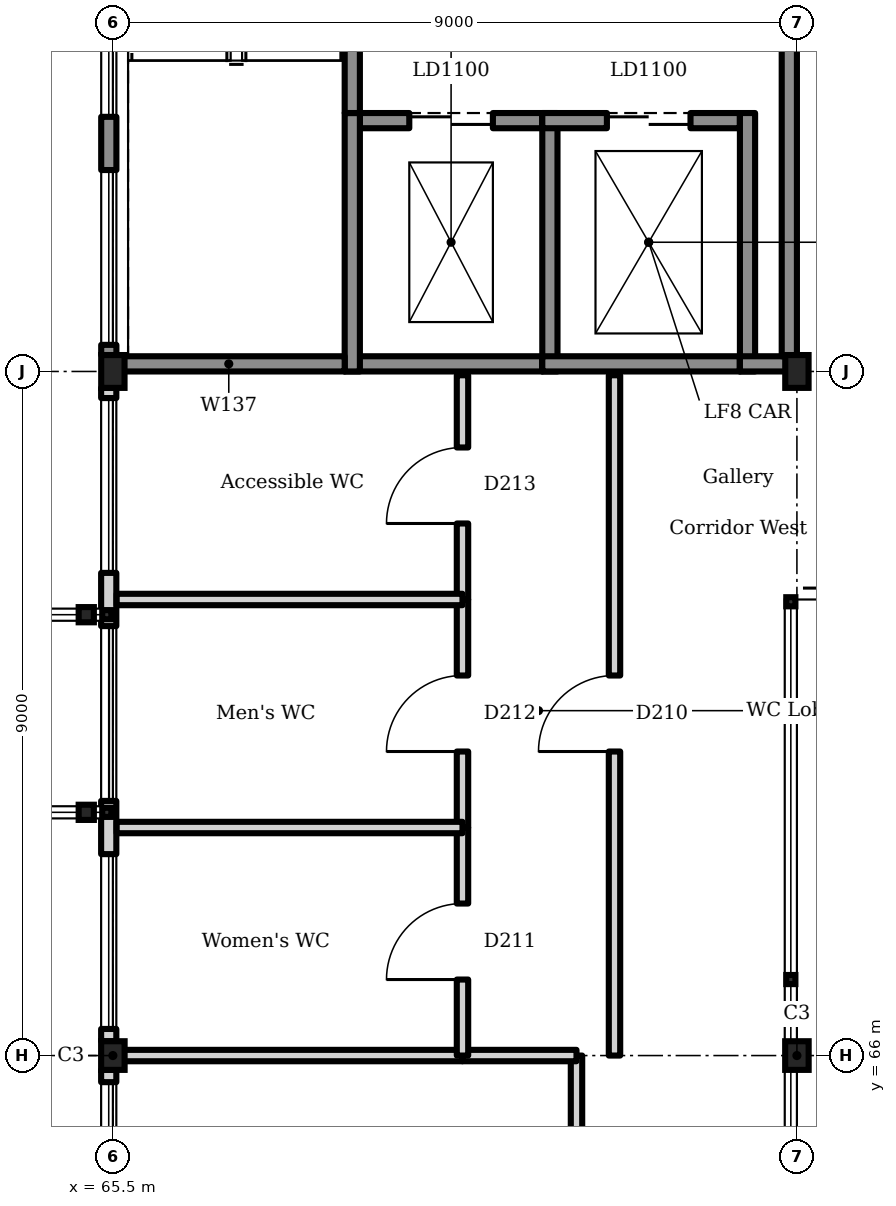
"""IFC4 building model, lengths in metres.
Left out: names, types, materials, properties, quantities, classifications, styles, units other than length and angle.
Written with IfcOpenShell. Run it as: python <this file> out.ifc"""

import sys

from ifc_helpers import new_model, si_unit, direction, frame, frame_2d, origin, origin_2d, place, context, subcontext, project, spatial, rectangle, hollow_rectangle, i_section, extrude, element, fill, save


model = new_model("IFC4")
c1 = context("Model", 3, precision=1e-05, world=origin(), true_north=direction((0.0, 1.0)))
c2 = subcontext(c1, "Body", "Model", "MODEL_VIEW")
j1 = project(units=[si_unit("LENGTHUNIT", "METRE"), si_unit("PLANEANGLEUNIT", "RADIAN")], contexts=[c1])
p1 = place(None, origin())
s1 = spatial("IfcSite", under=j1, at=p1, CompositionType="ELEMENT")
p2 = place(p1, origin())
s2 = spatial("IfcBuilding", under=s1, at=p2, CompositionType="ELEMENT")
p3 = place(p2, frame((0.0, 0.0, 14.4)))
s3 = spatial("IfcBuildingStorey", under=s2, at=p3, CompositionType="ELEMENT", Elevation=14.4)
p4 = place(p3, frame((68.75, 78.3, 0.0), z_axis=(0.0, 0.0, 1.0), x_axis=(1.0, 0.0, 0.0)))
e1 = element("IfcWall", 1, at=p4, inside=s3, PredefinedType="SOLIDWALL", context=c2, shape_type="SweptSolid", body=[
    extrude(rectangle(XDim=2.4, YDim=0.2, at=frame_2d((1.2, 0.0))), origin(), (0.0, 0.0, 1.0), 4.5),
])
p5 = place(p4, frame((0.65, 0.0, 0.0)))
e2 = element("IfcOpeningElement", 2, at=p5, cuts=e1, PredefinedType="OPENING", context=c2, shape_type="SweptSolid", body=[
    extrude(rectangle(XDim=1.1, YDim=2.1, at=frame_2d((0.55, 1.05))), frame((0.0, 0.11, 0.0), z_axis=(0.0, -1.0, 0.0), x_axis=(1.0, 0.0, 0.0)), (0.0, 0.0, 1.0), 0.22),
])
p6 = place(p3, frame((68.55, 75.1, 0.0), z_axis=(0.0, 0.0, 1.0), x_axis=(1.0, 0.0, 0.0)))
e3 = element("IfcWall", 3, at=p6, inside=s3, PredefinedType="SOLIDWALL", context=c2, shape_type="SweptSolid", body=[
    extrude(rectangle(XDim=2.6, YDim=0.2, at=frame_2d((1.3, 0.0))), origin(), (0.0, 0.0, 1.0), 4.5),
])
for number, where, z_axis, x_axis in (
    (4, (68.65, 75.0, 0.0), (0.0, 0.0, 1.0), (0.0, 1.0, 0.0)),
    (5, (71.25, 75.0, 0.0), (0.0, 0.0, 1.0), (0.0, 1.0, 0.0)),
):
    element("IfcWall", number, at=place(p3, frame(where, z_axis=z_axis, x_axis=x_axis)), inside=s3, PredefinedType="SOLIDWALL", context=c2, shape_type="SweptSolid", body=[
        extrude(rectangle(XDim=3.4, YDim=0.2, at=frame_2d((1.7, 0.0))), origin(), (0.0, 0.0, 1.0), 4.5),
    ])
p7 = place(p3, frame((71.15, 78.3, 0.0), z_axis=(0.0, 0.0, 1.0), x_axis=(1.0, 0.0, 0.0)))
e6 = element("IfcWall", 6, at=p7, inside=s3, PredefinedType="SOLIDWALL", context=c2, shape_type="SweptSolid", body=[
    extrude(rectangle(XDim=2.6, YDim=0.2, at=frame_2d((1.3, 0.0))), origin(), (0.0, 0.0, 1.0), 4.5),
])
p8 = place(p7, frame((0.85, 0.0, 0.0)))
e7 = element("IfcOpeningElement", 7, at=p8, cuts=e6, PredefinedType="OPENING", context=c2, shape_type="SweptSolid", body=[
    extrude(rectangle(XDim=1.1, YDim=2.1, at=frame_2d((0.55, 1.05))), frame((0.0, 0.11, 0.0), z_axis=(0.0, -1.0, 0.0), x_axis=(1.0, 0.0, 0.0)), (0.0, 0.0, 1.0), 0.22),
])
p9 = place(p3, frame((71.15, 75.1, 0.0), z_axis=(0.0, 0.0, 1.0), x_axis=(1.0, 0.0, 0.0)))
e8 = element("IfcWall", 8, at=p9, inside=s3, PredefinedType="SOLIDWALL", context=c2, shape_type="SweptSolid", body=[
    extrude(rectangle(XDim=2.6, YDim=0.2, at=frame_2d((1.3, 0.0))), origin(), (0.0, 0.0, 1.0), 4.5),
])
p10 = place(p3, frame((73.85, 75.0, 0.0), z_axis=(0.0, 0.0, 1.0), x_axis=(0.0, 1.0, 0.0)))
e9 = element("IfcWall", 9, at=p10, inside=s3, PredefinedType="SOLIDWALL", context=c2, shape_type="SweptSolid", body=[
    extrude(rectangle(XDim=3.4, YDim=0.2, at=frame_2d((1.7, 0.0))), origin(), (0.0, 0.0, 1.0), 4.5),
])
for number, where, z_axis, x_axis in (
    (10, (65.5, 66.0, 0.0), (0.0, 0.0, 1.0), (1.0, 0.0, 0.0)),
    (11, (74.5, 66.0, 0.0), (0.0, 0.0, 1.0), (1.0, 0.0, 0.0)),
):
    element("IfcColumn", number, at=place(p3, frame(where, z_axis=z_axis, x_axis=x_axis)), inside=s3, PredefinedType="COLUMN", context=c2, shape_type="SweptSolid", body=[
        extrude(i_section(OverallWidth=0.309, OverallDepth=0.377, WebThickness=0.021, FlangeThickness=0.04, FilletRadius=0.027, at=origin_2d()), origin(), (0.0, 0.0, 1.0), 4.25),
    ])
for number, where, z_axis, x_axis in (
    (12, (65.5, 75.0, 0.0), (0.0, 0.0, 1.0), (1.0, 0.0, 0.0)),
    (13, (74.5, 75.0, 0.0), (0.0, 0.0, 1.0), (1.0, 0.0, 0.0)),
):
    element("IfcColumn", number, at=place(p3, frame(where, z_axis=z_axis, x_axis=x_axis)), inside=s3, PredefinedType="COLUMN", context=c2, shape_type="SweptSolid", body=[
        extrude(i_section(OverallWidth=0.307, OverallDepth=0.432, WebThickness=0.021, FlangeThickness=0.04, FilletRadius=0.027, at=origin_2d()), origin(), (0.0, 0.0, 1.0), 4.5),
    ])
p11 = place(p3, frame((65.446, 57.188, 0.0), z_axis=(0.0, 0.0, 1.0), x_axis=(0.0, 1.0, 0.0)))
e14 = element("IfcWall", 14, at=p11, inside=s3, PredefinedType="SOLIDWALL", context=c2, shape_type="SweptSolid", body=[
    extrude(rectangle(XDim=8.623, YDim=0.2, at=frame_2d((4.312, 0.0))), origin(), (0.0, 0.0, 1.0), 3.8),
])
p12 = place(p11, frame((0.162, 0.0, 0.9)))
e15 = element("IfcOpeningElement", 15, at=p12, cuts=e14, PredefinedType="OPENING", context=c2, shape_type="SweptSolid", body=[
    extrude(rectangle(XDim=2.3, YDim=2.7, at=frame_2d((1.15, 1.35))), frame((0.0, 0.11, 0.0), z_axis=(0.0, -1.0, 0.0), x_axis=(1.0, 0.0, 0.0)), (0.0, 0.0, 1.0), 0.22),
])
p13 = place(p11, frame((3.162, 0.0, 0.9)))
e16 = element("IfcOpeningElement", 16, at=p13, cuts=e14, PredefinedType="OPENING", context=c2, shape_type="SweptSolid", body=[
    extrude(rectangle(XDim=2.3, YDim=2.7, at=frame_2d((1.15, 1.35))), frame((0.0, 0.11, 0.0), z_axis=(0.0, -1.0, 0.0), x_axis=(1.0, 0.0, 0.0)), (0.0, 0.0, 1.0), 0.22),
])
p14 = place(p11, frame((6.162, 0.0, 0.9)))
e17 = element("IfcOpeningElement", 17, at=p14, cuts=e14, PredefinedType="OPENING", context=c2, shape_type="SweptSolid", body=[
    extrude(rectangle(XDim=2.3, YDim=2.7, at=frame_2d((1.15, 1.35))), frame((0.0, 0.11, 0.0), z_axis=(0.0, -1.0, 0.0), x_axis=(1.0, 0.0, 0.0)), (0.0, 0.0, 1.0), 0.22),
])
p15 = place(p3, frame((65.446, 66.188, 0.0), z_axis=(0.0, 0.0, 1.0), x_axis=(0.0, 1.0, 0.0)))
e18 = element("IfcWall", 18, at=p15, inside=s3, PredefinedType="SOLIDWALL", context=c2, shape_type="SweptSolid", body=[
    extrude(rectangle(XDim=8.595, YDim=0.2, at=frame_2d((4.298, 0.0))), origin(), (0.0, 0.0, 1.0), 3.8),
])
p16 = place(p15, frame((0.162, 0.0, 0.9)))
e19 = element("IfcOpeningElement", 19, at=p16, cuts=e18, PredefinedType="OPENING", context=c2, shape_type="SweptSolid", body=[
    extrude(rectangle(XDim=2.3, YDim=2.7, at=frame_2d((1.15, 1.35))), frame((0.0, 0.11, 0.0), z_axis=(0.0, -1.0, 0.0), x_axis=(1.0, 0.0, 0.0)), (0.0, 0.0, 1.0), 0.22),
])
p17 = place(p15, frame((3.162, 0.0, 0.9)))
e20 = element("IfcOpeningElement", 20, at=p17, cuts=e18, PredefinedType="OPENING", context=c2, shape_type="SweptSolid", body=[
    extrude(rectangle(XDim=2.3, YDim=2.7, at=frame_2d((1.15, 1.35))), frame((0.0, 0.11, 0.0), z_axis=(0.0, -1.0, 0.0), x_axis=(1.0, 0.0, 0.0)), (0.0, 0.0, 1.0), 0.22),
])
p18 = place(p15, frame((6.162, 0.0, 0.9)))
e21 = element("IfcOpeningElement", 21, at=p18, cuts=e18, PredefinedType="OPENING", context=c2, shape_type="SweptSolid", body=[
    extrude(rectangle(XDim=2.3, YDim=2.7, at=frame_2d((1.15, 1.35))), frame((0.0, 0.11, 0.0), z_axis=(0.0, -1.0, 0.0), x_axis=(1.0, 0.0, 0.0)), (0.0, 0.0, 1.0), 0.22),
])
p19 = place(p3, frame((65.447, 75.216, 0.0), z_axis=(0.0, 0.0, 1.0), x_axis=(0.0, 1.0, 0.0)))
e22 = element("IfcWall", 22, at=p19, inside=s3, PredefinedType="SOLIDWALL", context=c2, shape_type="SweptSolid", body=[
    extrude(rectangle(XDim=8.418, YDim=0.2, at=frame_2d((4.209, 0.0))), origin(), (0.0, 0.0, 1.0), 4.3),
])
p20 = place(p19, frame((0.134, 0.0, 0.9)))
e23 = element("IfcOpeningElement", 23, at=p20, cuts=e22, PredefinedType="OPENING", context=c2, shape_type="SweptSolid", body=[
    extrude(rectangle(XDim=2.3, YDim=2.7, at=frame_2d((1.15, 1.35))), frame((0.0, 0.11, 0.0), z_axis=(0.0, -1.0, 0.0), x_axis=(1.0, 0.0, 0.0)), (0.0, 0.0, 1.0), 0.22),
])
p21 = place(p19, frame((3.134, 0.0, 0.9)))
e24 = element("IfcOpeningElement", 24, at=p21, cuts=e22, PredefinedType="OPENING", context=c2, shape_type="SweptSolid", body=[
    extrude(rectangle(XDim=2.3, YDim=2.7, at=frame_2d((1.15, 1.35))), frame((0.0, 0.11, 0.0), z_axis=(0.0, -1.0, 0.0), x_axis=(1.0, 0.0, 0.0)), (0.0, 0.0, 1.0), 0.22),
])
p22 = place(p3, frame((65.5, 75.1, 0.0), z_axis=(0.0, 0.0, 1.0), x_axis=(1.0, 0.0, 0.0)))
e25 = element("IfcWall", 25, at=p22, inside=s3, PredefinedType="SHEAR", context=c2, shape_type="SweptSolid", body=[
    extrude(rectangle(XDim=3.05, YDim=0.2, at=frame_2d((1.525, 0.0))), origin(), (0.0, 0.0, 1.0), 4.3),
])
p23 = place(p3, frame((73.75, 75.1, 0.0), z_axis=(0.0, 0.0, 1.0), x_axis=(1.0, 0.0, 0.0)))
e26 = element("IfcWall", 26, at=p23, inside=s3, PredefinedType="SHEAR", context=c2, shape_type="SweptSolid", body=[
    extrude(rectangle(XDim=0.75, YDim=0.2, at=frame_2d((0.375, 0.0))), origin(), (0.0, 0.0, 1.0), 3.75),
])
p24 = place(p3, frame((74.4, 75.2, 0.0), z_axis=(0.0, 0.0, 1.0), x_axis=(0.0, 1.0, 0.0)))
e27 = element("IfcWall", 27, at=p24, inside=s3, PredefinedType="SHEAR", context=c2, shape_type="SweptSolid", body=[
    extrude(rectangle(XDim=8.6, YDim=0.2, at=frame_2d((4.3, 0.0))), origin(), (0.0, 0.0, 1.0), 3.75),
])
p25 = place(p24, frame((4.9, 0.0, 0.0)))
e28 = element("IfcOpeningElement", 28, at=p25, cuts=e27, PredefinedType="OPENING", context=c2, shape_type="SweptSolid", body=[
    extrude(rectangle(XDim=1.8, YDim=2.1, at=frame_2d((0.9, 1.05))), frame((0.0, 0.11, 0.0), z_axis=(0.0, -1.0, 0.0), x_axis=(1.0, 0.0, 0.0)), (0.0, 0.0, 1.0), 0.22),
])
p26 = place(p3, frame((68.65, 78.4, 0.0), z_axis=(0.0, 0.0, 1.0), x_axis=(0.0, 1.0, 0.0)))
e29 = element("IfcWall", 29, at=p26, inside=s3, PredefinedType="SHEAR", context=c2, shape_type="SweptSolid", body=[
    extrude(rectangle(XDim=5.4, YDim=0.2, at=frame_2d((2.7, 0.0))), origin(), (0.0, 0.0, 1.0), 4.3),
])
p27 = place(p26, frame((4.1, 0.0, 0.0)))
e30 = element("IfcOpeningElement", 30, at=p27, cuts=e29, PredefinedType="OPENING", context=c2, shape_type="SweptSolid", body=[
    extrude(rectangle(XDim=1.0, YDim=2.1, at=frame_2d((0.5, 1.05))), frame((0.0, 0.11, 0.0), z_axis=(0.0, -1.0, 0.0), x_axis=(1.0, 0.0, 0.0)), (0.0, 0.0, 1.0), 0.22),
])
p28 = place(p3, frame((71.6, 57.05, 0.0), z_axis=(0.0, 0.0, 1.0), x_axis=(0.0, 1.0, 0.0)))
e31 = element("IfcWall", 31, at=p28, inside=s3, PredefinedType="PARTITIONING", context=c2, shape_type="SweptSolid", body=[
    extrude(rectangle(XDim=8.95, YDim=0.15, at=frame_2d((4.475, 0.0))), origin(), (0.0, 0.0, 1.0), 3.65),
])
p29 = place(p28, frame((3.95, 0.0, 0.0)))
e32 = element("IfcOpeningElement", 32, at=p29, cuts=e31, PredefinedType="OPENING", context=c2, shape_type="SweptSolid", body=[
    extrude(rectangle(XDim=1.0, YDim=2.1, at=frame_2d((0.5, 1.05))), frame((0.0, 0.085, 0.0), z_axis=(0.0, -1.0, 0.0), x_axis=(1.0, 0.0, 0.0)), (0.0, 0.0, 1.0), 0.17),
])
p30 = place(p3, frame((70.1, 66.0, 0.0), z_axis=(0.0, 0.0, 1.0), x_axis=(1.0, 0.0, 0.0)))
e33 = element("IfcWall", 33, at=p30, inside=s3, PredefinedType="PARTITIONING", context=c2, shape_type="SweptSolid", body=[
    extrude(rectangle(XDim=1.5, YDim=0.15, at=frame_2d((0.75, 0.0))), origin(), (0.0, 0.0, 1.0), 3.65),
])
p31 = place(p3, frame((65.55, 66.0, 0.0), z_axis=(0.0, 0.0, 1.0), x_axis=(1.0, 0.0, 0.0)))
e34 = element("IfcWall", 34, at=p31, inside=s3, PredefinedType="PARTITIONING", context=c2, shape_type="SweptSolid", body=[
    extrude(rectangle(XDim=4.55, YDim=0.15, at=frame_2d((2.275, 0.0))), origin(), (0.0, 0.0, 1.0), 3.65),
])
p32 = place(p3, frame((72.1, 66.0, 0.0), z_axis=(0.0, 0.0, 1.0), x_axis=(0.0, 1.0, 0.0)))
e35 = element("IfcWall", 35, at=p32, inside=s3, PredefinedType="PARTITIONING", context=c2, shape_type="SweptSolid", body=[
    extrude(rectangle(XDim=8.95, YDim=0.15, at=frame_2d((4.475, 0.0))), origin(), (0.0, 0.0, 1.0), 3.65),
])
p33 = place(p32, frame((4.0, 0.0, 0.0)))
e36 = element("IfcOpeningElement", 36, at=p33, cuts=e35, PredefinedType="OPENING", context=c2, shape_type="SweptSolid", body=[
    extrude(rectangle(XDim=1.0, YDim=2.1, at=frame_2d((0.5, 1.05))), frame((0.0, 0.085, 0.0), z_axis=(0.0, -1.0, 0.0), x_axis=(1.0, 0.0, 0.0)), (0.0, 0.0, 1.0), 0.17),
])
p34 = place(p3, frame((70.1, 72.0, 0.0), z_axis=(0.0, 0.0, 1.0), x_axis=(0.0, 1.0, 0.0)))
e37 = element("IfcWall", 37, at=p34, inside=s3, PredefinedType="PARTITIONING", context=c2, shape_type="SweptSolid", body=[
    extrude(rectangle(XDim=2.95, YDim=0.15, at=frame_2d((1.475, 0.0))), origin(), (0.0, 0.0, 1.0), 3.65),
])
p35 = place(p34, frame((1.0, 0.0, 0.0)))
e38 = element("IfcOpeningElement", 38, at=p35, cuts=e37, PredefinedType="OPENING", context=c2, shape_type="SweptSolid", body=[
    extrude(rectangle(XDim=1.0, YDim=2.1, at=frame_2d((0.5, 1.05))), frame((0.0, 0.085, 0.0), z_axis=(0.0, -1.0, 0.0), x_axis=(1.0, 0.0, 0.0)), (0.0, 0.0, 1.0), 0.17),
])
p36 = place(p3, frame((70.1, 69.0, 0.0), z_axis=(0.0, 0.0, 1.0), x_axis=(0.0, 1.0, 0.0)))
e39 = element("IfcWall", 39, at=p36, inside=s3, PredefinedType="PARTITIONING", context=c2, shape_type="SweptSolid", body=[
    extrude(rectangle(XDim=3.0, YDim=0.15, at=frame_2d((1.5, 0.0))), origin(), (0.0, 0.0, 1.0), 3.65),
])
p37 = place(p36, frame((1.0, 0.0, 0.0)))
e40 = element("IfcOpeningElement", 40, at=p37, cuts=e39, PredefinedType="OPENING", context=c2, shape_type="SweptSolid", body=[
    extrude(rectangle(XDim=1.0, YDim=2.1, at=frame_2d((0.5, 1.05))), frame((0.0, 0.085, 0.0), z_axis=(0.0, -1.0, 0.0), x_axis=(1.0, 0.0, 0.0)), (0.0, 0.0, 1.0), 0.17),
])
p38 = place(p3, frame((70.1, 66.0, 0.0), z_axis=(0.0, 0.0, 1.0), x_axis=(0.0, 1.0, 0.0)))
e41 = element("IfcWall", 41, at=p38, inside=s3, PredefinedType="PARTITIONING", context=c2, shape_type="SweptSolid", body=[
    extrude(rectangle(XDim=3.0, YDim=0.15, at=frame_2d((1.5, 0.0))), origin(), (0.0, 0.0, 1.0), 3.65),
])
p39 = place(p38, frame((1.0, 0.0, 0.0)))
e42 = element("IfcOpeningElement", 42, at=p39, cuts=e41, PredefinedType="OPENING", context=c2, shape_type="SweptSolid", body=[
    extrude(rectangle(XDim=1.0, YDim=2.1, at=frame_2d((0.5, 1.05))), frame((0.0, 0.085, 0.0), z_axis=(0.0, -1.0, 0.0), x_axis=(1.0, 0.0, 0.0)), (0.0, 0.0, 1.0), 0.17),
])
for number, where, z_axis, x_axis in (
    (43, (65.55, 69.0, 0.0), (0.0, 0.0, 1.0), (1.0, 0.0, 0.0)),
    (44, (65.55, 72.0, 0.0), (0.0, 0.0, 1.0), (1.0, 0.0, 0.0)),
):
    element("IfcWall", number, at=place(p3, frame(where, z_axis=z_axis, x_axis=x_axis)), inside=s3, PredefinedType="PARTITIONING", context=c2, shape_type="SweptSolid", body=[
        extrude(rectangle(XDim=4.55, YDim=0.15, at=frame_2d((2.275, 0.0))), origin(), (0.0, 0.0, 1.0), 3.65),
    ])
for number, where, z_axis, x_axis in (
    (45, (65.15, 69.2, 0.0), (0.0, 0.0, 1.0), (1.0, 0.0, 0.0)),
    (46, (65.15, 71.8, 0.0), (0.0, 0.0, 1.0), (1.0, 0.0, 0.0)),
):
    element("IfcColumn", number, at=place(p3, frame(where, z_axis=z_axis, x_axis=x_axis)), inside=s3, PredefinedType="COLUMN", context=c2, shape_type="SweptSolid", body=[
        extrude(hollow_rectangle(XDim=0.2, YDim=0.2, WallThickness=0.01, InnerFilletRadius=0.01, OuterFilletRadius=0.015, at=origin_2d()), origin(), (0.0, 0.0, 1.0), 3.85),
    ])
p40 = place(p5, origin())
e47 = element("IfcDoor", 47, at=p40, inside=s3, OperationType="SLIDING_TO_LEFT", PredefinedType="DOOR", context=c2, shape_type="SweptSolid", body=[
    extrude(rectangle(XDim=1.1, YDim=2.1, at=frame_2d((0.55, 1.05))), frame((0.0, 0.025, 0.0), z_axis=(0.0, -1.0, 0.0), x_axis=(1.0, 0.0, 0.0)), (0.0, 0.0, 1.0), 0.05),
])
fill(e2, e47)
p41 = place(p8, origin())
e48 = element("IfcDoor", 48, at=p41, inside=s3, OperationType="SLIDING_TO_LEFT", PredefinedType="DOOR", context=c2, shape_type="SweptSolid", body=[
    extrude(rectangle(XDim=1.1, YDim=2.1, at=frame_2d((0.55, 1.05))), frame((0.0, 0.025, 0.0), z_axis=(0.0, -1.0, 0.0), x_axis=(1.0, 0.0, 0.0)), (0.0, 0.0, 1.0), 0.05),
])
fill(e7, e48)
p42 = place(p14, origin())
e49 = element("IfcWindow", 49, at=p42, inside=s3, PartitioningType="SINGLE_PANEL", PredefinedType="WINDOW", context=c2, shape_type="SweptSolid", body=[
    extrude(rectangle(XDim=2.3, YDim=2.7, at=frame_2d((1.15, 1.35))), frame((0.0, 0.03, 0.0), z_axis=(0.0, -1.0, 0.0), x_axis=(1.0, 0.0, 0.0)), (0.0, 0.0, 1.0), 0.06),
])
fill(e17, e49)
p43 = place(p16, origin())
e50 = element("IfcWindow", 50, at=p43, inside=s3, PartitioningType="SINGLE_PANEL", PredefinedType="WINDOW", context=c2, shape_type="SweptSolid", body=[
    extrude(rectangle(XDim=2.3, YDim=2.7, at=frame_2d((1.15, 1.35))), frame((0.0, 0.03, 0.0), z_axis=(0.0, -1.0, 0.0), x_axis=(1.0, 0.0, 0.0)), (0.0, 0.0, 1.0), 0.06),
])
fill(e19, e50)
p44 = place(p17, origin())
e51 = element("IfcWindow", 51, at=p44, inside=s3, PartitioningType="SINGLE_PANEL", PredefinedType="WINDOW", context=c2, shape_type="SweptSolid", body=[
    extrude(rectangle(XDim=2.3, YDim=2.7, at=frame_2d((1.15, 1.35))), frame((0.0, 0.03, 0.0), z_axis=(0.0, -1.0, 0.0), x_axis=(1.0, 0.0, 0.0)), (0.0, 0.0, 1.0), 0.06),
])
fill(e20, e51)
p45 = place(p18, origin())
e52 = element("IfcWindow", 52, at=p45, inside=s3, PartitioningType="SINGLE_PANEL", PredefinedType="WINDOW", context=c2, shape_type="SweptSolid", body=[
    extrude(rectangle(XDim=2.3, YDim=2.7, at=frame_2d((1.15, 1.35))), frame((0.0, 0.03, 0.0), z_axis=(0.0, -1.0, 0.0), x_axis=(1.0, 0.0, 0.0)), (0.0, 0.0, 1.0), 0.06),
])
fill(e21, e52)
p46 = place(p20, origin())
e53 = element("IfcWindow", 53, at=p46, inside=s3, PartitioningType="SINGLE_PANEL", PredefinedType="WINDOW", context=c2, shape_type="SweptSolid", body=[
    extrude(rectangle(XDim=2.3, YDim=2.7, at=frame_2d((1.15, 1.35))), frame((0.0, 0.03, 0.0), z_axis=(0.0, -1.0, 0.0), x_axis=(1.0, 0.0, 0.0)), (0.0, 0.0, 1.0), 0.06),
])
fill(e23, e53)
p47 = place(p21, origin())
e54 = element("IfcWindow", 54, at=p47, inside=s3, PartitioningType="SINGLE_PANEL", PredefinedType="WINDOW", context=c2, shape_type="SweptSolid", body=[
    extrude(rectangle(XDim=2.3, YDim=2.7, at=frame_2d((1.15, 1.35))), frame((0.0, 0.03, 0.0), z_axis=(0.0, -1.0, 0.0), x_axis=(1.0, 0.0, 0.0)), (0.0, 0.0, 1.0), 0.06),
])
fill(e24, e54)
p48 = place(p33, origin())
e55 = element("IfcDoor", 55, at=p48, inside=s3, OperationType="SINGLE_SWING_RIGHT", PredefinedType="DOOR", context=c2, shape_type="SweptSolid", body=[
    extrude(rectangle(XDim=1.0, YDim=2.1, at=frame_2d((0.5, 1.05))), frame((0.0, 0.025, 0.0), z_axis=(0.0, -1.0, 0.0), x_axis=(1.0, 0.0, 0.0)), (0.0, 0.0, 1.0), 0.05),
])
fill(e36, e55)
p49 = place(p39, origin())
e56 = element("IfcDoor", 56, at=p49, inside=s3, OperationType="SINGLE_SWING_RIGHT", PredefinedType="DOOR", context=c2, shape_type="SweptSolid", body=[
    extrude(rectangle(XDim=1.0, YDim=2.1, at=frame_2d((0.5, 1.05))), frame((0.0, 0.025, 0.0), z_axis=(0.0, -1.0, 0.0), x_axis=(1.0, 0.0, 0.0)), (0.0, 0.0, 1.0), 0.05),
])
fill(e42, e56)
p50 = place(p37, origin())
e57 = element("IfcDoor", 57, at=p50, inside=s3, OperationType="SINGLE_SWING_RIGHT", PredefinedType="DOOR", context=c2, shape_type="SweptSolid", body=[
    extrude(rectangle(XDim=1.0, YDim=2.1, at=frame_2d((0.5, 1.05))), frame((0.0, 0.025, 0.0), z_axis=(0.0, -1.0, 0.0), x_axis=(1.0, 0.0, 0.0)), (0.0, 0.0, 1.0), 0.05),
])
fill(e40, e57)
p51 = place(p35, origin())
e58 = element("IfcDoor", 58, at=p51, inside=s3, OperationType="SINGLE_SWING_RIGHT", PredefinedType="DOOR", context=c2, shape_type="SweptSolid", body=[
    extrude(rectangle(XDim=1.0, YDim=2.1, at=frame_2d((0.5, 1.05))), frame((0.0, 0.025, 0.0), z_axis=(0.0, -1.0, 0.0), x_axis=(1.0, 0.0, 0.0)), (0.0, 0.0, 1.0), 0.05),
])
fill(e38, e58)
save(model, sys.argv[1])
